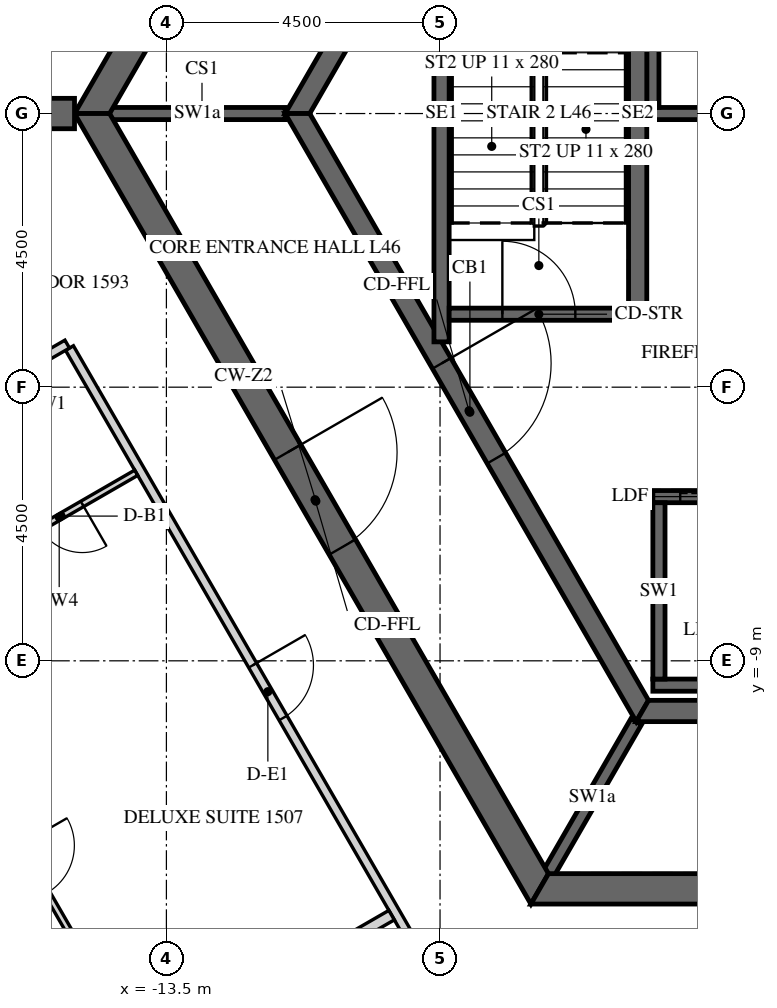
"""IFC4 building model, lengths in metres.
Left out: names, types, materials, properties, quantities, classifications, styles, units other than length and angle.
Written with IfcOpenShell. Run it as: python <this file> out.ifc"""

import sys

from ifc_helpers import new_model, si_unit, direction, frame, frame_2d, origin, place, context, subcontext, project, spatial, polyline, rectangle, outline, extrude, element, fill, save


model = new_model("IFC4")
c1 = context("Model", 3, precision=1e-05, world=origin(), true_north=direction((0.0, 1.0)))
c2 = subcontext(c1, "Body", "Model", "MODEL_VIEW")
j1 = project(units=[si_unit("LENGTHUNIT", "METRE"), si_unit("PLANEANGLEUNIT", "RADIAN")], contexts=[c1])
p1 = place(None, origin())
s1 = spatial("IfcSite", under=j1, at=p1, CompositionType="ELEMENT")
p2 = place(p1, origin())
s2 = spatial("IfcBuilding", under=s1, at=p2, CompositionType="ELEMENT")
p3 = place(p2, frame((0.0, 0.0, 195.6)))
s3 = spatial("IfcBuildingStorey", under=s2, at=p3, CompositionType="ELEMENT", Elevation=195.6)
p4 = place(p3, frame((-7.361, 12.75, -0.15), z_axis=(0.0, 0.0, 1.0), x_axis=(-0.50000571537, -0.866022103989, 0.0)))
e1 = element("IfcWall", 1, at=p4, inside=s3, PredefinedType="SHEAR", context=c2, shape_type="SweptSolid", body=[
    extrude(outline(polyline([(-0.144, -0.25), (14.867, -0.25), (14.578, 0.25), (0.144, 0.25), (-0.144, -0.25)])), origin(), (0.0, 0.0, 1.0), 3.9),
])
p5 = place(p4, frame((6.49, 0.0, 0.15)))
e2 = element("IfcOpeningElement", 2, at=p5, cuts=e1, PredefinedType="OPENING", context=c2, shape_type="SweptSolid", body=[
    extrude(rectangle(XDim=1.8, YDim=2.4, at=frame_2d((0.9, 1.2))), frame((0.0, 0.26, 0.0), z_axis=(0.0, -1.0, 0.0), x_axis=(1.0, 0.0, 0.0)), (0.0, 0.0, 1.0), 0.52),
])
p6 = place(p3, frame((-14.722, 0.0, -0.15), z_axis=(0.0, 0.0, 1.0), x_axis=(0.50000571537, -0.866022103989, 0.0)))
e3 = element("IfcWall", 3, at=p6, inside=s3, PredefinedType="SHEAR", context=c2, shape_type="SweptSolid", body=[
    extrude(outline(polyline([(-0.144, -0.25), (14.867, -0.25), (14.578, 0.25), (0.144, 0.25), (-0.144, -0.25)])), origin(), (0.0, 0.0, 1.0), 3.9),
])
p7 = place(p6, frame((6.432, 0.0, 0.15)))
e4 = element("IfcOpeningElement", 4, at=p7, cuts=e3, PredefinedType="OPENING", context=c2, shape_type="SweptSolid", body=[
    extrude(rectangle(XDim=1.8, YDim=2.4, at=frame_2d((0.9, 1.2))), frame((0.0, 0.26, 0.0), z_axis=(0.0, -1.0, 0.0), x_axis=(1.0, 0.0, 0.0)), (0.0, 0.0, 1.0), 0.52),
])
p8 = place(p3, frame((-7.361, -12.75, -0.15), z_axis=(0.0, 0.0, 1.0), x_axis=(1.0, 0.0, 0.0)))
e5 = element("IfcWall", 5, at=p8, inside=s3, PredefinedType="SHEAR", context=c2, shape_type="SweptSolid", body=[
    extrude(outline(polyline([(-0.144, -0.25), (14.866, -0.25), (14.578, 0.25), (0.144, 0.25), (-0.144, -0.25)])), origin(), (0.0, 0.0, 1.0), 3.9),
])
p9 = place(p8, frame((6.761, 0.0, 0.15)))
e6 = element("IfcOpeningElement", 6, at=p9, cuts=e5, PredefinedType="OPENING", context=c2, shape_type="SweptSolid", body=[
    extrude(rectangle(XDim=1.2, YDim=2.4, at=frame_2d((0.6, 1.2))), frame((0.0, 0.26, 0.0), z_axis=(0.0, -1.0, 0.0), x_axis=(1.0, 0.0, 0.0)), (0.0, 0.0, 1.0), 0.52),
])
p10 = place(p3, frame((-15.011, 0.0, -0.15), z_axis=(0.0, 0.0, 1.0), x_axis=(-1.0, 0.0, 0.0)))
e7 = element("IfcWall", 7, at=p10, inside=s3, PredefinedType="SHEAR", context=c2, shape_type="SweptSolid", body=[
    extrude(rectangle(XDim=15.424, YDim=0.5, at=frame_2d((7.712, 0.0))), origin(), (0.0, 0.0, 1.0), 3.9),
])
p11 = place(p10, frame((6.812, 0.0, 0.15)))
e8 = element("IfcOpeningElement", 8, at=p11, cuts=e7, PredefinedType="OPENING", context=c2, shape_type="SweptSolid", body=[
    extrude(rectangle(XDim=1.8, YDim=2.4, at=frame_2d((0.9, 1.2))), frame((0.0, 0.26, 0.0), z_axis=(0.0, -1.0, 0.0), x_axis=(1.0, 0.0, 0.0)), (0.0, 0.0, 1.0), 0.52),
])
p12 = place(p3, frame((-5.673, 9.825, -0.15), z_axis=(0.0, 0.0, 1.0), x_axis=(-0.499995046907, -0.866028263435, 0.0)))
e9 = element("IfcWall", 9, at=p12, inside=s3, PredefinedType="SHEAR", context=c2, shape_type="SweptSolid", body=[
    extrude(outline(polyline([(-0.101, -0.175), (11.446, -0.175), (11.244, 0.175), (0.101, 0.175), (-0.101, -0.175)])), origin(), (0.0, 0.0, 1.0), 3.9),
])
p13 = place(p12, frame((4.801, 0.0, 0.15)))
e10 = element("IfcOpeningElement", 10, at=p13, cuts=e9, PredefinedType="OPENING", context=c2, shape_type="SweptSolid", body=[
    extrude(rectangle(XDim=1.8, YDim=2.4, at=frame_2d((0.9, 1.2))), frame((0.0, 0.185, 0.0), z_axis=(0.0, -1.0, 0.0), x_axis=(1.0, 0.0, 0.0)), (0.0, 0.0, 1.0), 0.37),
])
p14 = place(p3, frame((-11.345, 0.0, -0.15), z_axis=(0.0, 0.0, 1.0), x_axis=(0.499995046907, -0.866028263435, 0.0)))
e11 = element("IfcWall", 11, at=p14, inside=s3, PredefinedType="SHEAR", context=c2, shape_type="SweptSolid", body=[
    extrude(outline(polyline([(-0.101, -0.175), (11.446, -0.175), (11.244, 0.175), (0.101, 0.175), (-0.101, -0.175)])), origin(), (0.0, 0.0, 1.0), 3.9),
])
p15 = place(p14, frame((4.744, 0.0, 0.15)))
e12 = element("IfcOpeningElement", 12, at=p15, cuts=e11, PredefinedType="OPENING", context=c2, shape_type="SweptSolid", body=[
    extrude(rectangle(XDim=1.8, YDim=2.4, at=frame_2d((0.9, 1.2))), frame((0.0, 0.185, 0.0), z_axis=(0.0, -1.0, 0.0), x_axis=(1.0, 0.0, 0.0)), (0.0, 0.0, 1.0), 0.37),
])
p16 = place(p3, frame((-5.673, -9.825, -0.15), z_axis=(0.0, 0.0, 1.0), x_axis=(1.0, 0.0, 0.0)))
e13 = element("IfcWall", 13, at=p16, inside=s3, PredefinedType="SHEAR", context=c2, shape_type="SweptSolid", body=[
    extrude(outline(polyline([(-0.101, -0.175), (11.446, -0.175), (11.244, 0.175), (0.101, 0.175), (-0.101, -0.175)])), origin(), (0.0, 0.0, 1.0), 3.9),
])
p17 = place(p3, frame((-5.6, 0.0, -0.25), z_axis=(0.0, 0.0, 1.0), x_axis=(1.0, 0.0, 0.0)))
e14 = element("IfcWall", 14, at=p17, inside=s3, PredefinedType="SHEAR", context=c2, shape_type="SweptSolid", body=[
    extrude(rectangle(XDim=11.2, YDim=0.2, at=frame_2d((5.6, 0.0))), origin(), (0.0, 0.0, 1.0), 3.9),
])
p18 = place(p3, frame((-5.5, 0.1, -0.25), z_axis=(0.0, 0.0, 1.0), x_axis=(0.0, 1.0, 0.0)))
e15 = element("IfcWall", 15, at=p18, inside=s3, PredefinedType="SHEAR", context=c2, shape_type="SweptSolid", body=[
    extrude(rectangle(XDim=3.1, YDim=0.2, at=frame_2d((1.55, 0.0))), origin(), (0.0, 0.0, 1.0), 3.9),
])
p19 = place(p3, frame((-5.5, -6.3, -0.25), z_axis=(0.0, 0.0, 1.0), x_axis=(1.0, 0.0, 0.0)))
e16 = element("IfcWall", 16, at=p19, inside=s3, PredefinedType="SHEAR", context=c2, shape_type="SweptSolid", body=[
    extrude(rectangle(XDim=9.2, YDim=0.2, at=frame_2d((4.6, 0.0))), origin(), (0.0, 0.0, 1.0), 3.9),
])
p20 = place(p19, frame((0.45, 0.0, 0.25)))
e17 = element("IfcOpeningElement", 17, at=p20, cuts=e16, PredefinedType="OPENING", context=c2, shape_type="SweptSolid", body=[
    extrude(rectangle(XDim=1.1, YDim=2.1, at=frame_2d((0.55, 1.05))), frame((0.0, 0.11, 0.0), z_axis=(0.0, -1.0, 0.0), x_axis=(1.0, 0.0, 0.0)), (0.0, 0.0, 1.0), 0.22),
])
p21 = place(p19, frame((2.25, 0.0, 0.25)))
e18 = element("IfcOpeningElement", 18, at=p21, cuts=e16, PredefinedType="OPENING", context=c2, shape_type="SweptSolid", body=[
    extrude(rectangle(XDim=1.1, YDim=2.1, at=frame_2d((0.55, 1.05))), frame((0.0, 0.11, 0.0), z_axis=(0.0, -1.0, 0.0), x_axis=(1.0, 0.0, 0.0)), (0.0, 0.0, 1.0), 0.22),
])
p22 = place(p19, frame((4.05, 0.0, 0.25)))
e19 = element("IfcOpeningElement", 19, at=p22, cuts=e16, PredefinedType="OPENING", context=c2, shape_type="SweptSolid", body=[
    extrude(rectangle(XDim=1.1, YDim=2.1, at=frame_2d((0.55, 1.05))), frame((0.0, 0.11, 0.0), z_axis=(0.0, -1.0, 0.0), x_axis=(1.0, 0.0, 0.0)), (0.0, 0.0, 1.0), 0.22),
])
p23 = place(p19, frame((5.85, 0.0, 0.25)))
e20 = element("IfcOpeningElement", 20, at=p23, cuts=e16, PredefinedType="OPENING", context=c2, shape_type="SweptSolid", body=[
    extrude(rectangle(XDim=1.1, YDim=2.1, at=frame_2d((0.55, 1.05))), frame((0.0, 0.11, 0.0), z_axis=(0.0, -1.0, 0.0), x_axis=(1.0, 0.0, 0.0)), (0.0, 0.0, 1.0), 0.22),
])
p24 = place(p19, frame((7.65, 0.0, 0.25)))
e21 = element("IfcOpeningElement", 21, at=p24, cuts=e16, PredefinedType="OPENING", context=c2, shape_type="SweptSolid", body=[
    extrude(rectangle(XDim=1.1, YDim=2.1, at=frame_2d((0.55, 1.05))), frame((0.0, 0.11, 0.0), z_axis=(0.0, -1.0, 0.0), x_axis=(1.0, 0.0, 0.0)), (0.0, 0.0, 1.0), 0.22),
])
p25 = place(p3, frame((-5.5, -9.4, -0.25), z_axis=(0.0, 0.0, 1.0), x_axis=(1.0, 0.0, 0.0)))
e22 = element("IfcWall", 22, at=p25, inside=s3, PredefinedType="SHEAR", context=c2, shape_type="SweptSolid", body=[
    extrude(rectangle(XDim=9.2, YDim=0.2, at=frame_2d((4.6, 0.0))), origin(), (0.0, 0.0, 1.0), 3.9),
])
p26 = place(p3, frame((-5.4, -9.3, -0.25), z_axis=(0.0, 0.0, 1.0), x_axis=(0.0, 1.0, 0.0)))
e23 = element("IfcWall", 23, at=p26, inside=s3, PredefinedType="SHEAR", context=c2, shape_type="SweptSolid", body=[
    extrude(rectangle(XDim=2.9, YDim=0.2, at=frame_2d((1.45, 0.0))), origin(), (0.0, 0.0, 1.0), 3.9),
])
for number, where, z_axis, x_axis in (
    (24, (-11.547, 0.0, -0.15), (0.0, 0.0, 1.0), (-1.0, 0.0, 0.0)),
    (25, (-5.773, -10.0, -0.15), (0.0, 0.0, 1.0), (-0.5, -0.866, 0.0)),
):
    element("IfcWall", number, at=place(p3, frame(where, z_axis=z_axis, x_axis=x_axis)), inside=s3, PredefinedType="SHEAR", context=c2, shape_type="SweptSolid", body=[
        extrude(rectangle(XDim=2.887, YDim=0.2, at=frame_2d((1.443, 0.0))), origin(), (0.0, 0.0, 1.0), 3.9),
    ])
p27 = place(p3, frame((-5.75, -3.4, -0.25), z_axis=(0.0, 0.0, 1.0), x_axis=(0.0, 1.0, 0.0)))
e26 = element("IfcWall", 26, at=p27, inside=s3, PredefinedType="SHEAR", context=c2, shape_type="SweptSolid", body=[
    extrude(rectangle(XDim=6.8, YDim=0.3, at=frame_2d((3.4, 0.0))), origin(), (0.0, 0.0, 1.0), 3.9),
])
p28 = place(p3, frame((-8.975, -3.755, -0.25), z_axis=(0.0, 0.0, 1.0), x_axis=(0.0, 1.0, 0.0)))
e27 = element("IfcWall", 27, at=p28, inside=s3, PredefinedType="SHEAR", context=c2, shape_type="SweptSolid", body=[
    extrude(rectangle(XDim=7.51, YDim=0.25, at=frame_2d((3.755, 0.0))), origin(), (0.0, 0.0, 1.0), 3.9),
])
p29 = place(p3, frame((-8.85, -3.3, -0.25), z_axis=(0.0, 0.0, 1.0), x_axis=(1.0, 0.0, 0.0)))
e28 = element("IfcWall", 28, at=p29, inside=s3, PredefinedType="SHEAR", context=c2, shape_type="SweptSolid", body=[
    extrude(rectangle(XDim=2.95, YDim=0.2, at=frame_2d((1.475, 0.0))), origin(), (0.0, 0.0, 1.0), 3.9),
])
p30 = place(p29, frame((0.875, 0.0, 0.25)))
e29 = element("IfcOpeningElement", 29, at=p30, cuts=e28, PredefinedType="OPENING", context=c2, shape_type="SweptSolid", body=[
    extrude(rectangle(XDim=1.2, YDim=2.4, at=frame_2d((0.6, 1.2))), frame((0.0, 0.11, 0.0), z_axis=(0.0, -1.0, 0.0), x_axis=(1.0, 0.0, 0.0)), (0.0, 0.0, 1.0), 0.22),
])
p31 = place(p3, frame((-15.094, -3.856, 0.0), z_axis=(0.0, 0.0, 1.0), x_axis=(0.500006037985, -0.866021917724, 0.0)))
e30 = element("IfcWall", 30, at=p31, inside=s3, PredefinedType="PARTITIONING", context=c2, shape_type="SweptSolid", body=[
    extrude(rectangle(XDim=12.867, YDim=0.15, at=frame_2d((6.434, 0.0))), origin(), (0.0, 0.0, 1.0), 2.988),
])
p32 = place(p31, frame((6.025, 0.0, 0.0)))
e31 = element("IfcOpeningElement", 31, at=p32, cuts=e30, PredefinedType="OPENING", context=c2, shape_type="SweptSolid", body=[
    extrude(rectangle(XDim=1.0, YDim=2.1, at=frame_2d((0.5, 1.05))), frame((0.0, 0.085, 0.0), z_axis=(0.0, -1.0, 0.0), x_axis=(1.0, 0.0, 0.0)), (0.0, 0.0, 1.0), 0.17),
])
p33 = place(p31, frame((11.717, 0.0, 0.0)))
e32 = element("IfcOpeningElement", 32, at=p33, cuts=e30, PredefinedType="OPENING", context=c2, shape_type="SweptSolid", body=[
    extrude(rectangle(XDim=1.0, YDim=2.1, at=frame_2d((0.5, 1.05))), frame((0.0, 0.085, 0.0), z_axis=(0.0, -1.0, 0.0), x_axis=(1.0, 0.0, 0.0)), (0.0, 0.0, 1.0), 0.17),
])
p34 = place(p3, frame((-16.49, -4.576, 0.0), z_axis=(0.0, 0.0, 1.0), x_axis=(0.865993845424, 0.5000546567, 0.0)))
e33 = element("IfcWall", 33, at=p34, inside=s3, PredefinedType="PARTITIONING", context=c2, shape_type="SweptSolid", body=[
    extrude(rectangle(XDim=1.569, YDim=0.15, at=frame_2d((0.785, 0.0))), origin(), (0.0, 0.0, 1.0), 2.988),
])
p35 = place(p3, frame((-13.996, -5.907, 0.0), z_axis=(0.0, 0.0, 1.0), x_axis=(-0.86601045545, -0.500025890382, 0.0)))
e34 = element("IfcWall", 34, at=p35, inside=s3, PredefinedType="PARTITIONING", context=c2, shape_type="SweptSolid", body=[
    extrude(rectangle(XDim=2.925, YDim=0.1, at=frame_2d((1.462, 0.0))), origin(), (0.0, 0.0, 1.0), 2.988),
])
p36 = place(p35, frame((1.025, 0.0, 0.0)))
e35 = element("IfcOpeningElement", 35, at=p36, cuts=e34, PredefinedType="OPENING", context=c2, shape_type="SweptSolid", body=[
    extrude(rectangle(XDim=0.8, YDim=2.1, at=frame_2d((0.4, 1.05))), frame((0.0, 0.06, 0.0), z_axis=(0.0, -1.0, 0.0), x_axis=(1.0, 0.0, 0.0)), (0.0, 0.0, 1.0), 0.12),
])
p37 = place(p3, frame((-17.463, -9.353, 0.0), z_axis=(0.0, 0.0, 1.0), x_axis=(0.499995846692, -0.866027801685, 0.0)))
e36 = element("IfcWall", 36, at=p37, inside=s3, PredefinedType="PARTITIONING", context=c2, shape_type="SweptSolid", body=[
    extrude(rectangle(XDim=7.06, YDim=0.1, at=frame_2d((3.53, 0.0))), origin(), (0.0, 0.0, 1.0), 2.988),
])
p38 = place(p37, frame((3.1, 0.0, 0.0)))
e37 = element("IfcOpeningElement", 37, at=p38, cuts=e36, PredefinedType="OPENING", context=c2, shape_type="SweptSolid", body=[
    extrude(rectangle(XDim=0.9, YDim=2.1, at=frame_2d((0.45, 1.05))), frame((0.0, 0.06, 0.0), z_axis=(0.0, -1.0, 0.0), x_axis=(1.0, 0.0, 0.0)), (0.0, 0.0, 1.0), 0.12),
])
p39 = place(p3, frame((-20.513, -19.37, 0.0), z_axis=(0.0, 0.0, 1.0), x_axis=(0.866024931941, 0.500000817256, 0.0)))
e38 = element("IfcWall", 38, at=p39, inside=s3, PredefinedType="PARTITIONING", context=c2, shape_type="SweptSolid", body=[
    extrude(rectangle(XDim=12.375, YDim=0.18, at=frame_2d((6.188, 0.0))), origin(), (0.0, 0.0, 1.0), 2.988),
])
p40 = place(p7, origin())
e39 = element("IfcDoor", 39, at=p40, inside=s3, OperationType="DOUBLE_DOOR_SINGLE_SWING", PredefinedType="DOOR", context=c2, shape_type="SweptSolid", body=[
    extrude(rectangle(XDim=1.8, YDim=2.4, at=frame_2d((0.9, 1.2))), frame((0.0, 0.025, 0.0), z_axis=(0.0, -1.0, 0.0), x_axis=(1.0, 0.0, 0.0)), (0.0, 0.0, 1.0), 0.05),
])
fill(e4, e39)
p41 = place(p15, origin())
e40 = element("IfcDoor", 40, at=p41, inside=s3, OperationType="DOUBLE_DOOR_SINGLE_SWING", PredefinedType="DOOR", context=c2, shape_type="SweptSolid", body=[
    extrude(rectangle(XDim=1.8, YDim=2.4, at=frame_2d((0.9, 1.2))), frame((0.0, 0.025, 0.0), z_axis=(0.0, -1.0, 0.0), x_axis=(1.0, 0.0, 0.0)), (0.0, 0.0, 1.0), 0.05),
])
fill(e12, e40)
p42 = place(p30, origin())
e41 = element("IfcDoor", 41, at=p42, inside=s3, OperationType="SINGLE_SWING_LEFT", PredefinedType="DOOR", context=c2, shape_type="SweptSolid", body=[
    extrude(rectangle(XDim=1.2, YDim=2.4, at=frame_2d((0.6, 1.2))), frame((0.0, 0.025, 0.0), z_axis=(0.0, -1.0, 0.0), x_axis=(1.0, 0.0, 0.0)), (0.0, 0.0, 1.0), 0.05),
])
fill(e29, e41)
p43 = place(p20, origin())
e42 = element("IfcDoor", 42, at=p43, inside=s3, OperationType="SLIDING_TO_LEFT", PredefinedType="DOOR", context=c2, shape_type="SweptSolid", body=[
    extrude(rectangle(XDim=1.1, YDim=2.1, at=frame_2d((0.55, 1.05))), frame((0.0, 0.025, 0.0), z_axis=(0.0, -1.0, 0.0), x_axis=(1.0, 0.0, 0.0)), (0.0, 0.0, 1.0), 0.05),
])
fill(e17, e42)
p44 = place(p32, origin())
e43 = element("IfcDoor", 43, at=p44, inside=s3, OperationType="SINGLE_SWING_LEFT", PredefinedType="DOOR", context=c2, shape_type="SweptSolid", body=[
    extrude(rectangle(XDim=1.0, YDim=2.1, at=frame_2d((0.5, 1.05))), frame((0.0, 0.025, 0.0), z_axis=(0.0, -1.0, 0.0), x_axis=(1.0, 0.0, 0.0)), (0.0, 0.0, 1.0), 0.05),
])
fill(e31, e43)
p45 = place(p36, origin())
e44 = element("IfcDoor", 44, at=p45, inside=s3, OperationType="SINGLE_SWING_RIGHT", PredefinedType="DOOR", context=c2, shape_type="SweptSolid", body=[
    extrude(rectangle(XDim=0.8, YDim=2.1, at=frame_2d((0.4, 1.05))), frame((0.0, 0.025, 0.0), z_axis=(0.0, -1.0, 0.0), x_axis=(1.0, 0.0, 0.0)), (0.0, 0.0, 1.0), 0.05),
])
fill(e35, e44)
save(model, sys.argv[1])
